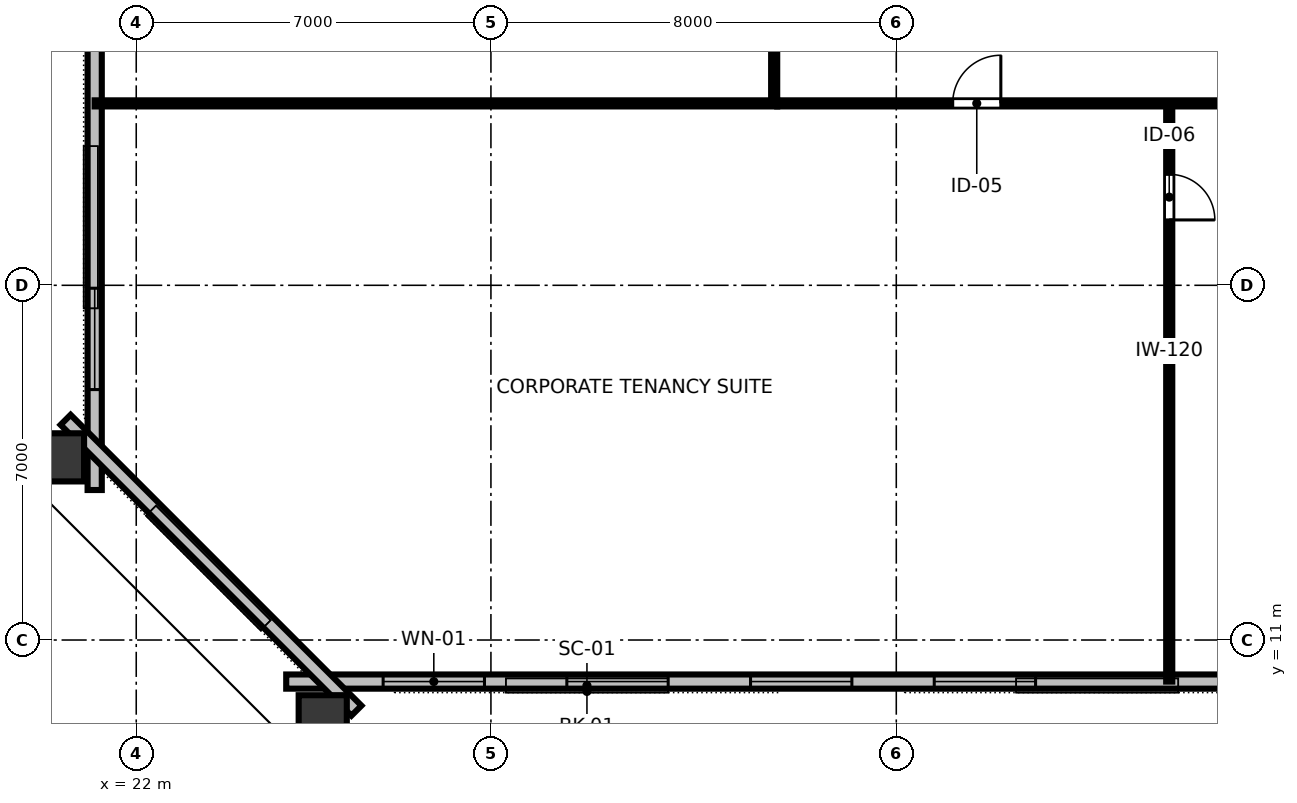
"""IFC4 building model, lengths in metres.
Left out: names, types, materials, properties, quantities, classifications, styles, units other than length and angle.
Written with IfcOpenShell. Run it as: python <this file> out.ifc"""

import sys

from ifc_helpers import new_model, si_unit, direction, frame, frame_2d, origin, origin_2d, place, context, subcontext, project, spatial, rectangle, hollow_rectangle, extrude, element, fill, save


model = new_model("IFC4")
c1 = context("Model", 3, precision=1e-05, world=origin(), true_north=direction((0.0, 1.0)))
c2 = subcontext(c1, "Body", "Model", "MODEL_VIEW")
j1 = project(units=[si_unit("LENGTHUNIT", "METRE"), si_unit("PLANEANGLEUNIT", "RADIAN")], contexts=[c1])
p1 = place(None, origin())
s1 = spatial("IfcSite", under=j1, at=p1, CompositionType="ELEMENT")
p2 = place(p1, origin())
s2 = spatial("IfcBuilding", under=s1, at=p2, CompositionType="ELEMENT")
p3 = place(p2, frame((0.0, 0.0, 74.8)))
s3 = spatial("IfcBuildingStorey", under=s2, at=p3, CompositionType="ELEMENT", Elevation=74.8)
for number, where, z_axis, x_axis in (
    (1, (25.681, 9.336, 0.0), (0.0, 0.0, 1.0), (1.0, 0.0, 0.0)),
    (2, (20.396, 14.604, 0.0), (0.0, 0.0, 1.0), (0.0, 1.0, 0.0)),
):
    element("IfcColumn", number, at=place(p3, frame(where, z_axis=z_axis, x_axis=x_axis)), inside=s3, PredefinedType="COLUMN", context=c2, shape_type="SweptSolid", body=[
        extrude(hollow_rectangle(XDim=0.95, YDim=1.15, WallThickness=0.06, at=origin_2d()), origin(), (0.0, 0.0, 1.0), 3.358),
    ])
p4 = place(p3, frame((24.96, 10.18, 0.0), z_axis=(0.0, 0.0, 1.0), x_axis=(1.0, 0.0, 0.0)))
e3 = element("IfcWall", 3, at=p4, inside=s3, PredefinedType="STANDARD", context=c2, shape_type="SweptSolid", body=[
    extrude(rectangle(XDim=42.08, YDim=0.28, at=frame_2d((21.04, 0.0))), origin(), (0.0, 0.0, 1.0), 3.36),
])
p5 = place(p4, frame((1.913, 0.0, 0.8)))
e4 = element("IfcOpeningElement", 4, at=p5, cuts=e3, PredefinedType="OPENING", context=c2, shape_type="SweptSolid", body=[
    extrude(rectangle(XDim=2.0, YDim=1.95, at=frame_2d((1.0, 0.975))), frame((0.0, 0.15, 0.0), z_axis=(0.0, -1.0, 0.0), x_axis=(1.0, 0.0, 0.0)), (0.0, 0.0, 1.0), 0.3),
])
p6 = place(p4, frame((5.538, 0.0, 0.8)))
e5 = element("IfcOpeningElement", 5, at=p6, cuts=e3, PredefinedType="OPENING", context=c2, shape_type="SweptSolid", body=[
    extrude(rectangle(XDim=2.0, YDim=1.95, at=frame_2d((1.0, 0.975))), frame((0.0, 0.15, 0.0), z_axis=(0.0, -1.0, 0.0), x_axis=(1.0, 0.0, 0.0)), (0.0, 0.0, 1.0), 0.3),
])
p7 = place(p4, frame((9.164, 0.0, 0.8)))
e6 = element("IfcOpeningElement", 6, at=p7, cuts=e3, PredefinedType="OPENING", context=c2, shape_type="SweptSolid", body=[
    extrude(rectangle(XDim=2.0, YDim=1.95, at=frame_2d((1.0, 0.975))), frame((0.0, 0.15, 0.0), z_axis=(0.0, -1.0, 0.0), x_axis=(1.0, 0.0, 0.0)), (0.0, 0.0, 1.0), 0.3),
])
p8 = place(p4, frame((12.789, 0.0, 0.8)))
e7 = element("IfcOpeningElement", 7, at=p8, cuts=e3, PredefinedType="OPENING", context=c2, shape_type="SweptSolid", body=[
    extrude(rectangle(XDim=2.0, YDim=1.95, at=frame_2d((1.0, 0.975))), frame((0.0, 0.15, 0.0), z_axis=(0.0, -1.0, 0.0), x_axis=(1.0, 0.0, 0.0)), (0.0, 0.0, 1.0), 0.3),
])
p9 = place(p4, frame((23.666, 0.0, 0.8)))
e8 = element("IfcOpeningElement", 8, at=p9, cuts=e3, PredefinedType="OPENING", context=c2, shape_type="SweptSolid", body=[
    extrude(rectangle(XDim=2.0, YDim=1.95, at=frame_2d((1.0, 0.975))), frame((0.0, 0.15, 0.0), z_axis=(0.0, -1.0, 0.0), x_axis=(1.0, 0.0, 0.0)), (0.0, 0.0, 1.0), 0.3),
])
p10 = place(p4, frame((27.291, 0.0, 0.8)))
e9 = element("IfcOpeningElement", 9, at=p10, cuts=e3, PredefinedType="OPENING", context=c2, shape_type="SweptSolid", body=[
    extrude(rectangle(XDim=2.0, YDim=1.95, at=frame_2d((1.0, 0.975))), frame((0.0, 0.15, 0.0), z_axis=(0.0, -1.0, 0.0), x_axis=(1.0, 0.0, 0.0)), (0.0, 0.0, 1.0), 0.3),
])
p11 = place(p4, frame((30.917, 0.0, 0.8)))
e10 = element("IfcOpeningElement", 10, at=p11, cuts=e3, PredefinedType="OPENING", context=c2, shape_type="SweptSolid", body=[
    extrude(rectangle(XDim=2.0, YDim=1.95, at=frame_2d((1.0, 0.975))), frame((0.0, 0.15, 0.0), z_axis=(0.0, -1.0, 0.0), x_axis=(1.0, 0.0, 0.0)), (0.0, 0.0, 1.0), 0.3),
])
p12 = place(p4, frame((34.542, 0.0, 0.8)))
e11 = element("IfcOpeningElement", 11, at=p12, cuts=e3, PredefinedType="OPENING", context=c2, shape_type="SweptSolid", body=[
    extrude(rectangle(XDim=2.0, YDim=1.95, at=frame_2d((1.0, 0.975))), frame((0.0, 0.15, 0.0), z_axis=(0.0, -1.0, 0.0), x_axis=(1.0, 0.0, 0.0)), (0.0, 0.0, 1.0), 0.3),
])
p13 = place(p4, frame((38.167, 0.0, 0.8)))
e12 = element("IfcOpeningElement", 12, at=p13, cuts=e3, PredefinedType="OPENING", context=c2, shape_type="SweptSolid", body=[
    extrude(rectangle(XDim=2.0, YDim=1.95, at=frame_2d((1.0, 0.975))), frame((0.0, 0.15, 0.0), z_axis=(0.0, -1.0, 0.0), x_axis=(1.0, 0.0, 0.0)), (0.0, 0.0, 1.0), 0.3),
])
p14 = place(p3, frame((21.18, 50.04, 0.0), z_axis=(0.0, 0.0, 1.0), x_axis=(0.0, -1.0, 0.0)))
e13 = element("IfcWall", 13, at=p14, inside=s3, PredefinedType="STANDARD", context=c2, shape_type="SweptSolid", body=[
    extrude(rectangle(XDim=36.08, YDim=0.28, at=frame_2d((18.04, 0.0))), origin(), (0.0, 0.0, 1.0), 3.36),
])
p15 = place(p14, frame((1.982, 0.0, 0.8)))
e14 = element("IfcOpeningElement", 14, at=p15, cuts=e13, PredefinedType="OPENING", context=c2, shape_type="SweptSolid", body=[
    extrude(rectangle(XDim=2.0, YDim=1.95, at=frame_2d((1.0, 0.975))), frame((0.0, 0.15, 0.0), z_axis=(0.0, -1.0, 0.0), x_axis=(1.0, 0.0, 0.0)), (0.0, 0.0, 1.0), 0.3),
])
p16 = place(p14, frame((9.511, 0.0, 0.8)))
e15 = element("IfcOpeningElement", 15, at=p16, cuts=e13, PredefinedType="OPENING", context=c2, shape_type="SweptSolid", body=[
    extrude(rectangle(XDim=2.0, YDim=1.95, at=frame_2d((1.0, 0.975))), frame((0.0, 0.15, 0.0), z_axis=(0.0, -1.0, 0.0), x_axis=(1.0, 0.0, 0.0)), (0.0, 0.0, 1.0), 0.3),
])
p17 = place(p14, frame((13.276, 0.0, 0.8)))
e16 = element("IfcOpeningElement", 16, at=p17, cuts=e13, PredefinedType="OPENING", context=c2, shape_type="SweptSolid", body=[
    extrude(rectangle(XDim=2.0, YDim=1.95, at=frame_2d((1.0, 0.975))), frame((0.0, 0.15, 0.0), z_axis=(0.0, -1.0, 0.0), x_axis=(1.0, 0.0, 0.0)), (0.0, 0.0, 1.0), 0.3),
])
p18 = place(p14, frame((20.804, 0.0, 0.8)))
e17 = element("IfcOpeningElement", 17, at=p18, cuts=e13, PredefinedType="OPENING", context=c2, shape_type="SweptSolid", body=[
    extrude(rectangle(XDim=2.0, YDim=1.95, at=frame_2d((1.0, 0.975))), frame((0.0, 0.15, 0.0), z_axis=(0.0, -1.0, 0.0), x_axis=(1.0, 0.0, 0.0)), (0.0, 0.0, 1.0), 0.3),
])
p19 = place(p14, frame((24.569, 0.0, 0.8)))
e18 = element("IfcOpeningElement", 18, at=p19, cuts=e13, PredefinedType="OPENING", context=c2, shape_type="SweptSolid", body=[
    extrude(rectangle(XDim=2.0, YDim=1.95, at=frame_2d((1.0, 0.975))), frame((0.0, 0.15, 0.0), z_axis=(0.0, -1.0, 0.0), x_axis=(1.0, 0.0, 0.0)), (0.0, 0.0, 1.0), 0.3),
])
p20 = place(p14, frame((32.098, 0.0, 0.8)))
e19 = element("IfcOpeningElement", 19, at=p20, cuts=e13, PredefinedType="OPENING", context=c2, shape_type="SweptSolid", body=[
    extrude(rectangle(XDim=2.0, YDim=1.95, at=frame_2d((1.0, 0.975))), frame((0.0, 0.15, 0.0), z_axis=(0.0, -1.0, 0.0), x_axis=(1.0, 0.0, 0.0)), (0.0, 0.0, 1.0), 0.3),
])
p21 = place(p3, frame((20.606, 15.345, 0.0), z_axis=(0.0, 0.0, 1.0), x_axis=(0.707106781187, -0.707106781187, 0.0)))
e20 = element("IfcWall", 20, at=p21, inside=s3, PredefinedType="STANDARD", context=c2, shape_type="SweptSolid", body=[
    extrude(rectangle(XDim=8.116, YDim=0.28, at=frame_2d((4.058, 0.0))), origin(), (0.0, 0.0, 1.0), 3.36),
])
p22 = place(p3, frame((42.387, 21.59, 0.0), z_axis=(0.0, 0.0, 1.0), x_axis=(0.0, -1.0, 0.0)))
e21 = element("IfcWall", 21, at=p22, inside=s3, PredefinedType="PARTITIONING", context=c2, shape_type="SweptSolid", body=[
    extrude(rectangle(XDim=11.41, YDim=0.12, at=frame_2d((5.705, 0.0))), origin(), (0.0, 0.0, 1.0), 2.64),
])
p23 = place(p22, frame((1.4, 0.0, 0.0)))
e22 = element("IfcOpeningElement", 22, at=p23, cuts=e21, PredefinedType="OPENING", context=c2, shape_type="SweptSolid", body=[
    extrude(rectangle(XDim=0.9, YDim=2.15, at=frame_2d((0.45, 1.075))), frame((0.0, 0.07, 0.0), z_axis=(0.0, -1.0, 0.0), x_axis=(1.0, 0.0, 0.0)), (0.0, 0.0, 1.0), 0.14),
])
p24 = place(p3, frame((34.65, 21.59, 0.0), z_axis=(0.0, 0.0, 1.0), x_axis=(1.0, 0.0, 0.0)))
e23 = element("IfcWall", 23, at=p24, inside=s3, PredefinedType="PARTITIONING", context=c2, shape_type="SweptSolid", body=[
    extrude(rectangle(XDim=22.7, YDim=0.12, at=frame_2d((11.35, 0.0))), origin(), (0.0, 0.0, 1.0), 2.64),
])
p25 = place(p24, frame((3.463, 0.0, 0.0)))
e24 = element("IfcOpeningElement", 24, at=p25, cuts=e23, PredefinedType="OPENING", context=c2, shape_type="SweptSolid", body=[
    extrude(rectangle(XDim=0.95, YDim=2.15, at=frame_2d((0.475, 1.075))), frame((0.0, 0.07, 0.0), z_axis=(0.0, -1.0, 0.0), x_axis=(1.0, 0.0, 0.0)), (0.0, 0.0, 1.0), 0.14),
])
p26 = place(p24, frame((14.673, 0.0, 0.0)))
e25 = element("IfcOpeningElement", 25, at=p26, cuts=e23, PredefinedType="OPENING", context=c2, shape_type="SweptSolid", body=[
    extrude(rectangle(XDim=0.95, YDim=2.15, at=frame_2d((0.475, 1.075))), frame((0.0, 0.07, 0.0), z_axis=(0.0, -1.0, 0.0), x_axis=(1.0, 0.0, 0.0)), (0.0, 0.0, 1.0), 0.14),
])
p27 = place(p3, frame((34.59, 21.65, 0.0), z_axis=(0.0, 0.0, 1.0), x_axis=(0.0, 1.0, 0.0)))
e26 = element("IfcWall", 26, at=p27, inside=s3, PredefinedType="PARTITIONING", context=c2, shape_type="SweptSolid", body=[
    extrude(rectangle(XDim=20.7, YDim=0.12, at=frame_2d((10.35, 0.0))), origin(), (0.0, 0.0, 1.0), 2.64),
])
p28 = place(p27, frame((2.105, 0.0, 0.0)))
e27 = element("IfcOpeningElement", 27, at=p28, cuts=e26, PredefinedType="OPENING", context=c2, shape_type="SweptSolid", body=[
    extrude(rectangle(XDim=0.95, YDim=2.15, at=frame_2d((0.475, 1.075))), frame((0.0, 0.07, 0.0), z_axis=(0.0, -1.0, 0.0), x_axis=(1.0, 0.0, 0.0)), (0.0, 0.0, 1.0), 0.14),
])
p29 = place(p27, frame((7.369, 0.0, 0.0)))
e28 = element("IfcOpeningElement", 28, at=p29, cuts=e26, PredefinedType="OPENING", context=c2, shape_type="SweptSolid", body=[
    extrude(rectangle(XDim=0.95, YDim=2.15, at=frame_2d((0.475, 1.075))), frame((0.0, 0.07, 0.0), z_axis=(0.0, -1.0, 0.0), x_axis=(1.0, 0.0, 0.0)), (0.0, 0.0, 1.0), 0.14),
])
p30 = place(p27, frame((15.139, 0.0, 0.0)))
e29 = element("IfcOpeningElement", 29, at=p30, cuts=e26, PredefinedType="OPENING", context=c2, shape_type="SweptSolid", body=[
    extrude(rectangle(XDim=0.95, YDim=2.15, at=frame_2d((0.475, 1.075))), frame((0.0, 0.07, 0.0), z_axis=(0.0, -1.0, 0.0), x_axis=(1.0, 0.0, 0.0)), (0.0, 0.0, 1.0), 0.14),
])
p31 = place(p3, frame((34.65, 21.59, 0.0), z_axis=(0.0, 0.0, 1.0), x_axis=(-1.0, 0.0, 0.0)))
e30 = element("IfcWall", 30, at=p31, inside=s3, PredefinedType="PARTITIONING", context=c2, shape_type="SweptSolid", body=[
    extrude(rectangle(XDim=13.47, YDim=0.12, at=frame_2d((6.735, 0.0))), origin(), (0.0, 0.0, 1.0), 2.64),
])
p32 = place(p5, origin())
e31 = element("IfcWindow", 31, at=p32, inside=s3, PartitioningType="SINGLE_PANEL", PredefinedType="WINDOW", context=c2, shape_type="SweptSolid", body=[
    extrude(rectangle(XDim=2.0, YDim=1.95, at=frame_2d((1.0, 0.975))), frame((0.0, 0.03, 0.0), z_axis=(0.0, -1.0, 0.0), x_axis=(1.0, 0.0, 0.0)), (0.0, 0.0, 1.0), 0.06),
])
fill(e4, e31)
p33 = place(p6, origin())
e32 = element("IfcWindow", 32, at=p33, inside=s3, PartitioningType="SINGLE_PANEL", PredefinedType="WINDOW", context=c2, shape_type="SweptSolid", body=[
    extrude(rectangle(XDim=2.0, YDim=1.95, at=frame_2d((1.0, 0.975))), frame((0.0, 0.03, 0.0), z_axis=(0.0, -1.0, 0.0), x_axis=(1.0, 0.0, 0.0)), (0.0, 0.0, 1.0), 0.06),
])
fill(e5, e32)
p34 = place(p7, origin())
e33 = element("IfcWindow", 33, at=p34, inside=s3, PartitioningType="SINGLE_PANEL", PredefinedType="WINDOW", context=c2, shape_type="SweptSolid", body=[
    extrude(rectangle(XDim=2.0, YDim=1.95, at=frame_2d((1.0, 0.975))), frame((0.0, 0.03, 0.0), z_axis=(0.0, -1.0, 0.0), x_axis=(1.0, 0.0, 0.0)), (0.0, 0.0, 1.0), 0.06),
])
fill(e6, e33)
p35 = place(p8, origin())
e34 = element("IfcWindow", 34, at=p35, inside=s3, PartitioningType="SINGLE_PANEL", PredefinedType="WINDOW", context=c2, shape_type="SweptSolid", body=[
    extrude(rectangle(XDim=2.0, YDim=1.95, at=frame_2d((1.0, 0.975))), frame((0.0, 0.03, 0.0), z_axis=(0.0, -1.0, 0.0), x_axis=(1.0, 0.0, 0.0)), (0.0, 0.0, 1.0), 0.06),
])
fill(e7, e34)
p36 = place(p20, origin())
e35 = element("IfcWindow", 35, at=p36, inside=s3, PartitioningType="SINGLE_PANEL", PredefinedType="WINDOW", context=c2, shape_type="SweptSolid", body=[
    extrude(rectangle(XDim=2.0, YDim=1.95, at=frame_2d((1.0, 0.975))), frame((0.0, 0.03, 0.0), z_axis=(0.0, -1.0, 0.0), x_axis=(1.0, 0.0, 0.0)), (0.0, 0.0, 1.0), 0.06),
])
fill(e19, e35)
p37 = place(p23, origin())
e36 = element("IfcDoor", 36, at=p37, inside=s3, OperationType="SINGLE_SWING_RIGHT", PredefinedType="DOOR", context=c2, shape_type="SweptSolid", body=[
    extrude(rectangle(XDim=0.9, YDim=2.15, at=frame_2d((0.45, 1.075))), frame((0.0, 0.025, 0.0), z_axis=(0.0, -1.0, 0.0), x_axis=(1.0, 0.0, 0.0)), (0.0, 0.0, 1.0), 0.05),
])
fill(e22, e36)
p38 = place(p25, origin())
e37 = element("IfcDoor", 37, at=p38, inside=s3, OperationType="SINGLE_SWING_RIGHT", PredefinedType="DOOR", context=c2, shape_type="SweptSolid", body=[
    extrude(rectangle(XDim=0.95, YDim=2.15, at=frame_2d((0.475, 1.075))), frame((0.0, 0.025, 0.0), z_axis=(0.0, -1.0, 0.0), x_axis=(1.0, 0.0, 0.0)), (0.0, 0.0, 1.0), 0.05),
])
fill(e24, e37)
save(model, sys.argv[1])
